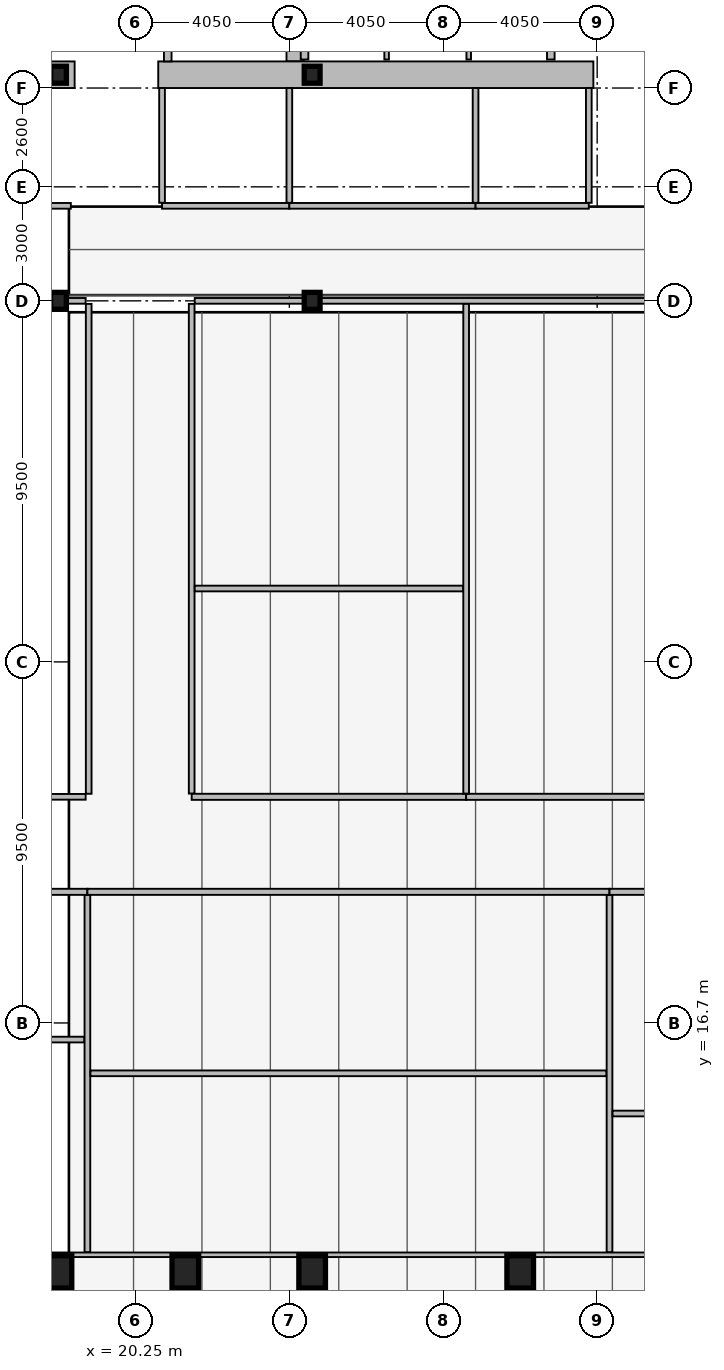
"""IFC4 building model, lengths in metres.
Left out: names, types, materials, properties, quantities, classifications, styles, units other than length and angle.
Written with IfcOpenShell. Run it as: python <this file> out.ifc"""

import sys

from ifc_helpers import new_model, si_unit, direction, frame, frame_2d, origin, origin_2d, place, context, subcontext, project, spatial, rectangle, hollow_rectangle, i_section, extrude, element, fill, save


model = new_model("IFC4")
c1 = context("Model", 3, precision=1e-05, world=origin(), true_north=direction((0.0, 1.0)))
c2 = subcontext(c1, "Body", "Model", "MODEL_VIEW")
j1 = project(units=[si_unit("LENGTHUNIT", "METRE"), si_unit("PLANEANGLEUNIT", "RADIAN")], contexts=[c1])
p1 = place(None, origin())
s1 = spatial("IfcSite", under=j1, at=p1, CompositionType="ELEMENT")
p2 = place(p1, origin())
s2 = spatial("IfcBuilding", under=s1, at=p2, CompositionType="ELEMENT")
p3 = place(p2, frame((0.0, 0.0, 154.2)))
s3 = spatial("IfcBuildingStorey", under=s2, at=p3, CompositionType="ELEMENT", Elevation=154.2)
p4 = place(p3, frame((24.45, 42.0, 0.0), z_axis=(0.0, 0.0, 1.0), x_axis=(0.0, 1.0, 0.0)))
e1 = element("IfcWall", 1, at=p4, inside=s3, PredefinedType="SHEAR", context=c2, shape_type="SweptSolid", body=[
    extrude(rectangle(XDim=11.0, YDim=0.45, at=frame_2d((5.5, 0.0))), origin(), (0.0, 0.0, 1.0), 3.44),
])
p5 = place(p3, frame((18.65, 41.65, 0.0), z_axis=(0.0, 0.0, 1.0), x_axis=(-1.0, 0.0, 0.0)))
e2 = element("IfcWall", 2, at=p5, inside=s3, PredefinedType="SHEAR", context=c2, shape_type="SweptSolid", body=[
    extrude(rectangle(XDim=2.45, YDim=0.7, at=frame_2d((1.225, 0.0))), origin(), (0.0, 0.0, 1.0), 3.44),
])
p6 = place(p3, frame((32.3, 41.65, 0.0), z_axis=(0.0, 0.0, 1.0), x_axis=(-1.0, 0.0, 0.0)))
e3 = element("IfcWall", 3, at=p6, inside=s3, PredefinedType="SHEAR", context=c2, shape_type="SweptSolid", body=[
    extrude(rectangle(XDim=11.45, YDim=0.7, at=frame_2d((5.725, 0.0))), origin(), (0.0, 0.0, 1.0), 3.44),
])
for number, where, z_axis, x_axis in (
    (4, (18.225, 10.15, 0.0), (0.0, 0.0, 1.0), (1.0, 0.0, 0.0)),
    (5, (21.562, 10.15, 0.0), (0.0, 0.0, 1.0), (1.0, 0.0, 0.0)),
    (6, (24.9, 10.15, 0.0), (0.0, 0.0, 1.0), (1.0, 0.0, 0.0)),
    (7, (30.375, 10.15, 0.0), (0.0, 0.0, 1.0), (1.0, 0.0, 0.0)),
):
    element("IfcColumn", number, at=place(p3, frame(where, z_axis=z_axis, x_axis=x_axis)), inside=s3, PredefinedType="COLUMN", context=c2, shape_type="SweptSolid", body=[
        extrude(hollow_rectangle(XDim=0.7, YDim=0.85, WallThickness=0.05, at=origin_2d()), origin(), (0.0, 0.0, 1.0), 3.6),
    ])
for number, where, z_axis, x_axis in (
    (8, (18.225, 35.7, 0.0), (0.0, 0.0, 1.0), (1.0, 0.0, 0.0)),
    (9, (18.225, 41.65, 0.0), (0.0, 0.0, 1.0), (1.0, 0.0, 0.0)),
    (10, (24.9, 35.7, 0.0), (0.0, 0.0, 1.0), (1.0, 0.0, 0.0)),
    (11, (24.9, 41.65, 0.0), (0.0, 0.0, 1.0), (1.0, 0.0, 0.0)),
):
    element("IfcColumn", number, at=place(p3, frame(where, z_axis=z_axis, x_axis=x_axis)), inside=s3, PredefinedType="COLUMN", context=c2, shape_type="SweptSolid", body=[
        extrude(i_section(OverallWidth=0.416, OverallDepth=0.446, WebThickness=0.039, FlangeThickness=0.063, at=origin_2d()), origin(), (0.0, 0.0, 1.0), 3.6),
    ])
p7 = place(p3, frame((21.1, 42.0, 0.0), z_axis=(0.0, 0.0, 1.0), x_axis=(0.0, 1.0, 0.0)))
e12 = element("IfcWall", 12, at=p7, inside=s3, PredefinedType="PARTITIONING", context=c2, shape_type="SweptSolid", body=[
    extrude(rectangle(XDim=2.495, YDim=0.2, at=frame_2d((1.248, 0.0))), origin(), (0.0, 0.0, 1.0), 3.44),
])
p8 = place(p7, frame((0.38, 0.0, 0.0)))
e13 = element("IfcOpeningElement", 13, at=p8, cuts=e12, PredefinedType="OPENING", context=c2, shape_type="SweptSolid", body=[
    extrude(rectangle(XDim=1.05, YDim=2.15, at=frame_2d((0.525, 1.075))), frame((0.0, 0.11, 0.0), z_axis=(0.0, -1.0, 0.0), x_axis=(1.0, 0.0, 0.0)), (0.0, 0.0, 1.0), 0.22),
])
for number, where, z_axis, x_axis in (
    (14, (24.7, 42.05, 0.0), (0.0, 0.0, 1.0), (0.0, 1.0, 0.0)),
    (15, (31.18, 42.05, 0.0), (0.0, 0.0, 1.0), (0.0, 1.0, 0.0)),
):
    element("IfcWall", number, at=place(p3, frame(where, z_axis=z_axis, x_axis=x_axis)), inside=s3, PredefinedType="PARTITIONING", context=c2, shape_type="SweptSolid", body=[
        extrude(rectangle(XDim=2.2, YDim=0.2, at=frame_2d((1.1, 0.0))), origin(), (0.0, 0.0, 1.0), 3.44),
    ])
for number, where, z_axis, x_axis in (
    (16, (26.86, 42.05, 0.0), (0.0, 0.0, 1.0), (0.0, 1.0, 0.0)),
    (17, (29.02, 42.05, 0.0), (0.0, 0.0, 1.0), (0.0, 1.0, 0.0)),
):
    element("IfcWall", number, at=place(p3, frame(where, z_axis=z_axis, x_axis=x_axis)), inside=s3, PredefinedType="PARTITIONING", context=c2, shape_type="SweptSolid", body=[
        extrude(rectangle(XDim=2.2, YDim=0.12, at=frame_2d((1.1, 0.0))), origin(), (0.0, 0.0, 1.0), 3.44),
    ])
p9 = place(p3, frame((20.95, 38.2, 0.0), z_axis=(0.0, 0.0, 1.0), x_axis=(1.0, 0.0, 0.0)))
e18 = element("IfcWall", 18, at=p9, inside=s3, PredefinedType="PARTITIONING", context=c2, shape_type="SweptSolid", body=[
    extrude(rectangle(XDim=3.35, YDim=0.15, at=frame_2d((1.675, 0.0))), origin(), (0.0, 0.0, 1.0), 3.44),
])
p10 = place(p9, frame((0.9, 0.0, 0.0)))
e19 = element("IfcOpeningElement", 19, at=p10, cuts=e18, PredefinedType="OPENING", context=c2, shape_type="SweptSolid", body=[
    extrude(rectangle(XDim=0.95, YDim=2.05, at=frame_2d((0.475, 1.025))), frame((0.0, 0.085, 0.0), z_axis=(0.0, -1.0, 0.0), x_axis=(1.0, 0.0, 0.0)), (0.0, 0.0, 1.0), 0.17),
])
p11 = place(p3, frame((24.3, 38.2, 0.0), z_axis=(0.0, 0.0, 1.0), x_axis=(1.0, 0.0, 0.0)))
e20 = element("IfcWall", 20, at=p11, inside=s3, PredefinedType="PARTITIONING", context=c2, shape_type="SweptSolid", body=[
    extrude(rectangle(XDim=4.9, YDim=0.15, at=frame_2d((2.45, 0.0))), origin(), (0.0, 0.0, 1.0), 2.73),
])
p12 = place(p11, frame((0.9, 0.0, 0.0)))
e21 = element("IfcOpeningElement", 21, at=p12, cuts=e20, PredefinedType="OPENING", context=c2, shape_type="SweptSolid", body=[
    extrude(rectangle(XDim=0.95, YDim=2.05, at=frame_2d((0.475, 1.025))), frame((0.0, 0.085, 0.0), z_axis=(0.0, -1.0, 0.0), x_axis=(1.0, 0.0, 0.0)), (0.0, 0.0, 1.0), 0.17),
])
p13 = place(p3, frame((29.2, 38.2, 0.0), z_axis=(0.0, 0.0, 1.0), x_axis=(1.0, 0.0, 0.0)))
e22 = element("IfcWall", 22, at=p13, inside=s3, PredefinedType="PARTITIONING", context=c2, shape_type="SweptSolid", body=[
    extrude(rectangle(XDim=2.98, YDim=0.15, at=frame_2d((1.49, 0.0))), origin(), (0.0, 0.0, 1.0), 2.73),
])
p14 = place(p13, frame((0.7, 0.0, 0.0)))
e23 = element("IfcOpeningElement", 23, at=p14, cuts=e22, PredefinedType="OPENING", context=c2, shape_type="SweptSolid", body=[
    extrude(rectangle(XDim=0.95, YDim=2.05, at=frame_2d((0.475, 1.025))), frame((0.0, 0.085, 0.0), z_axis=(0.0, -1.0, 0.0), x_axis=(1.0, 0.0, 0.0)), (0.0, 0.0, 1.0), 0.17),
])
for number, where, z_axis, x_axis in (
    (24, (20.95, 38.28, 0.0), (0.0, 0.0, 1.0), (0.0, 1.0, 0.0)),
    (25, (24.3, 38.28, 0.0), (0.0, 0.0, 1.0), (0.0, 1.0, 0.0)),
    (26, (29.2, 38.28, 0.0), (0.0, 0.0, 1.0), (0.0, 1.0, 0.0)),
    (27, (32.18, 38.28, 0.0), (0.0, 0.0, 1.0), (0.0, 1.0, 0.0)),
):
    element("IfcWall", number, at=place(p3, frame(where, z_axis=z_axis, x_axis=x_axis)), inside=s3, PredefinedType="PARTITIONING", context=c2, shape_type="SweptSolid", body=[
        extrude(rectangle(XDim=3.02, YDim=0.15, at=frame_2d((1.51, 0.0))), origin(), (0.0, 0.0, 1.0), 3.44),
    ])
p15 = place(p3, frame((6.03, 38.2, 0.0), z_axis=(0.0, 0.0, 1.0), x_axis=(1.0, 0.0, 0.0)))
e28 = element("IfcWall", 28, at=p15, inside=s3, PredefinedType="PARTITIONING", context=c2, shape_type="SweptSolid", body=[
    extrude(rectangle(XDim=12.52, YDim=0.15, at=frame_2d((6.26, 0.0))), origin(), (0.0, 0.0, 1.0), 2.73),
])
p16 = place(p15, frame((8.32, 0.0, 0.0)))
e29 = element("IfcOpeningElement", 29, at=p16, cuts=e28, PredefinedType="OPENING", context=c2, shape_type="SweptSolid", body=[
    extrude(rectangle(XDim=0.95, YDim=2.05, at=frame_2d((0.475, 1.025))), frame((0.0, 0.085, 0.0), z_axis=(0.0, -1.0, 0.0), x_axis=(1.0, 0.0, 0.0)), (0.0, 0.0, 1.0), 0.17),
])
p17 = place(p3, frame((6.03, 20.15, 0.0), z_axis=(0.0, 0.0, 1.0), x_axis=(1.0, 0.0, 0.0)))
e30 = element("IfcWall", 30, at=p17, inside=s3, PredefinedType="PARTITIONING", context=c2, shape_type="SweptSolid", body=[
    extrude(rectangle(XDim=12.956, YDim=0.16, at=frame_2d((6.478, 0.0))), origin(), (0.0, 0.0, 1.0), 2.73),
])
p18 = place(p17, frame((5.691, 0.0, 0.0)))
e31 = element("IfcOpeningElement", 31, at=p18, cuts=e30, PredefinedType="OPENING", context=c2, shape_type="SweptSolid", body=[
    extrude(rectangle(XDim=1.0, YDim=2.05, at=frame_2d((0.5, 1.025))), frame((0.0, 0.09, 0.0), z_axis=(0.0, -1.0, 0.0), x_axis=(1.0, 0.0, 0.0)), (0.0, 0.0, 1.0), 0.18),
])
p19 = place(p3, frame((6.095, 16.263, 0.0), z_axis=(0.0, 0.0, 1.0), x_axis=(1.0, 0.0, 0.0)))
e32 = element("IfcWall", 32, at=p19, inside=s3, PredefinedType="PARTITIONING", context=c2, shape_type="SweptSolid", body=[
    extrude(rectangle(XDim=12.811, YDim=0.15, at=frame_2d((6.406, 0.0))), origin(), (0.0, 0.0, 1.0), 2.73),
])
p20 = place(p19, frame((5.83, 0.0, 0.0)))
e33 = element("IfcOpeningElement", 33, at=p20, cuts=e32, PredefinedType="OPENING", context=c2, shape_type="SweptSolid", body=[
    extrude(rectangle(XDim=0.9, YDim=2.05, at=frame_2d((0.45, 1.025))), frame((0.0, 0.085, 0.0), z_axis=(0.0, -1.0, 0.0), x_axis=(1.0, 0.0, 0.0)), (0.0, 0.0, 1.0), 0.17),
])
p21 = place(p3, frame((18.986, 20.15, 0.0), z_axis=(0.0, 0.0, 1.0), x_axis=(1.0, 0.0, 0.0)))
e34 = element("IfcWall", 34, at=p21, inside=s3, PredefinedType="PARTITIONING", context=c2, shape_type="SweptSolid", body=[
    extrude(rectangle(XDim=13.739, YDim=0.16, at=frame_2d((6.869, 0.0))), origin(), (0.0, 0.0, 1.0), 2.73),
])
p22 = place(p21, frame((6.02, 0.0, 0.0)))
e35 = element("IfcOpeningElement", 35, at=p22, cuts=e34, PredefinedType="OPENING", context=c2, shape_type="SweptSolid", body=[
    extrude(rectangle(XDim=1.0, YDim=2.05, at=frame_2d((0.5, 1.025))), frame((0.0, 0.09, 0.0), z_axis=(0.0, -1.0, 0.0), x_axis=(1.0, 0.0, 0.0)), (0.0, 0.0, 1.0), 0.18),
])
p23 = place(p3, frame((18.986, 10.665, 0.0), z_axis=(0.0, 0.0, 1.0), x_axis=(0.0, 1.0, 0.0)))
e36 = element("IfcWall", 36, at=p23, inside=s3, PredefinedType="PARTITIONING", context=c2, shape_type="SweptSolid", body=[
    extrude(rectangle(XDim=9.4, YDim=0.15, at=frame_2d((4.7, 0.0))), origin(), (0.0, 0.0, 1.0), 2.93),
])
p24 = place(p3, frame((19.066, 15.375, 0.0), z_axis=(0.0, 0.0, 1.0), x_axis=(1.0, 0.0, 0.0)))
e37 = element("IfcWall", 37, at=p24, inside=s3, PredefinedType="PARTITIONING", context=c2, shape_type="SweptSolid", body=[
    extrude(rectangle(XDim=13.579, YDim=0.15, at=frame_2d((6.79, 0.0))), origin(), (0.0, 0.0, 1.0), 2.73),
])
p25 = place(p24, frame((6.183, 0.0, 0.0)))
e38 = element("IfcOpeningElement", 38, at=p25, cuts=e37, PredefinedType="OPENING", context=c2, shape_type="SweptSolid", body=[
    extrude(rectangle(XDim=0.9, YDim=2.05, at=frame_2d((0.45, 1.025))), frame((0.0, 0.085, 0.0), z_axis=(0.0, -1.0, 0.0), x_axis=(1.0, 0.0, 0.0)), (0.0, 0.0, 1.0), 0.17),
])
p26 = place(p3, frame((32.725, 20.15, 0.0), z_axis=(0.0, 0.0, 1.0), x_axis=(1.0, 0.0, 0.0)))
e39 = element("IfcWall", 39, at=p26, inside=s3, PredefinedType="PARTITIONING", context=c2, shape_type="SweptSolid", body=[
    extrude(rectangle(XDim=14.093, YDim=0.16, at=frame_2d((7.046, 0.0))), origin(), (0.0, 0.0, 1.0), 2.73),
])
p27 = place(p26, frame((6.169, 0.0, 0.0)))
e40 = element("IfcOpeningElement", 40, at=p27, cuts=e39, PredefinedType="OPENING", context=c2, shape_type="SweptSolid", body=[
    extrude(rectangle(XDim=1.6, YDim=2.15, at=frame_2d((0.8, 1.075))), frame((0.0, 0.09, 0.0), z_axis=(0.0, -1.0, 0.0), x_axis=(1.0, 0.0, 0.0)), (0.0, 0.0, 1.0), 0.18),
])
p28 = place(p3, frame((32.725, 10.665, 0.0), z_axis=(0.0, 0.0, 1.0), x_axis=(0.0, 1.0, 0.0)))
e41 = element("IfcWall", 41, at=p28, inside=s3, PredefinedType="PARTITIONING", context=c2, shape_type="SweptSolid", body=[
    extrude(rectangle(XDim=9.4, YDim=0.15, at=frame_2d((4.7, 0.0))), origin(), (0.0, 0.0, 1.0), 2.93),
])
p29 = place(p3, frame((32.805, 14.317, 0.0), z_axis=(0.0, 0.0, 1.0), x_axis=(1.0, 0.0, 0.0)))
e42 = element("IfcWall", 42, at=p29, inside=s3, PredefinedType="PARTITIONING", context=c2, shape_type="SweptSolid", body=[
    extrude(rectangle(XDim=13.933, YDim=0.15, at=frame_2d((6.966, 0.0))), origin(), (0.0, 0.0, 1.0), 2.73),
])
p30 = place(p29, frame((6.342, 0.0, 0.0)))
e43 = element("IfcOpeningElement", 43, at=p30, cuts=e42, PredefinedType="OPENING", context=c2, shape_type="SweptSolid", body=[
    extrude(rectangle(XDim=0.9, YDim=2.05, at=frame_2d((0.45, 1.025))), frame((0.0, 0.085, 0.0), z_axis=(0.0, -1.0, 0.0), x_axis=(1.0, 0.0, 0.0)), (0.0, 0.0, 1.0), 0.17),
])
p31 = place(p3, frame((19.02, 22.73, 0.0), z_axis=(0.0, 0.0, 1.0), x_axis=(0.0, 1.0, 0.0)))
e44 = element("IfcWall", 44, at=p31, inside=s3, PredefinedType="PARTITIONING", context=c2, shape_type="SweptSolid", body=[
    extrude(rectangle(XDim=12.89, YDim=0.15, at=frame_2d((6.445, 0.0))), origin(), (0.0, 0.0, 1.0), 2.93),
])
p32 = place(p31, frame((3.2, 0.0, 0.0)))
e45 = element("IfcOpeningElement", 45, at=p32, cuts=e44, PredefinedType="OPENING", context=c2, shape_type="SweptSolid", body=[
    extrude(rectangle(XDim=1.0, YDim=2.05, at=frame_2d((0.5, 1.025))), frame((0.0, 0.085, 0.0), z_axis=(0.0, -1.0, 0.0), x_axis=(1.0, 0.0, 0.0)), (0.0, 0.0, 1.0), 0.17),
])
for number, where, z_axis, x_axis in (
    (46, (6.095, 22.65, 0.0), (0.0, 0.0, 1.0), (1.0, 0.0, 0.0)),
    (47, (6.095, 35.7, 0.0), (0.0, 0.0, 1.0), (1.0, 0.0, 0.0)),
):
    element("IfcWall", number, at=place(p3, frame(where, z_axis=z_axis, x_axis=x_axis)), inside=s3, PredefinedType="PARTITIONING", context=c2, shape_type="SweptSolid", body=[
        extrude(rectangle(XDim=12.845, YDim=0.15, at=frame_2d((6.422, 0.0))), origin(), (0.0, 0.0, 1.0), 2.73),
    ])
p33 = place(p3, frame((21.73, 22.735, 0.0), z_axis=(0.0, 0.0, 1.0), x_axis=(0.0, 1.0, 0.0)))
e48 = element("IfcWall", 48, at=p33, inside=s3, PredefinedType="PARTITIONING", context=c2, shape_type="SweptSolid", body=[
    extrude(rectangle(XDim=12.885, YDim=0.15, at=frame_2d((6.442, 0.0))), origin(), (0.0, 0.0, 1.0), 2.93),
])
p34 = place(p3, frame((21.81, 35.7, 0.0), z_axis=(0.0, 0.0, 1.0), x_axis=(1.0, 0.0, 0.0)))
e49 = element("IfcWall", 49, at=p34, inside=s3, PredefinedType="PARTITIONING", context=c2, shape_type="SweptSolid", body=[
    extrude(rectangle(XDim=44.995, YDim=0.15, at=frame_2d((22.498, 0.0))), origin(), (0.0, 0.0, 1.0), 2.73),
])
p35 = place(p3, frame((21.73, 22.65, 0.0), z_axis=(0.0, 0.0, 1.0), x_axis=(1.0, 0.0, 0.0)))
e50 = element("IfcWall", 50, at=p35, inside=s3, PredefinedType="PARTITIONING", context=c2, shape_type="SweptSolid", body=[
    extrude(rectangle(XDim=7.222, YDim=0.16, at=frame_2d((3.611, 0.0))), origin(), (0.0, 0.0, 1.0), 2.73),
])
p36 = place(p35, frame((3.283, 0.0, 0.0)))
e51 = element("IfcOpeningElement", 51, at=p36, cuts=e50, PredefinedType="OPENING", context=c2, shape_type="SweptSolid", body=[
    extrude(rectangle(XDim=1.0, YDim=2.05, at=frame_2d((0.5, 1.025))), frame((0.0, 0.09, 0.0), z_axis=(0.0, -1.0, 0.0), x_axis=(1.0, 0.0, 0.0)), (0.0, 0.0, 1.0), 0.18),
])
p37 = place(p3, frame((21.81, 28.131, 0.0), z_axis=(0.0, 0.0, 1.0), x_axis=(1.0, 0.0, 0.0)))
e52 = element("IfcWall", 52, at=p37, inside=s3, PredefinedType="PARTITIONING", context=c2, shape_type="SweptSolid", body=[
    extrude(rectangle(XDim=7.062, YDim=0.15, at=frame_2d((3.531, 0.0))), origin(), (0.0, 0.0, 1.0), 2.73),
])
p38 = place(p37, frame((3.25, 0.0, 0.0)))
e53 = element("IfcOpeningElement", 53, at=p38, cuts=e52, PredefinedType="OPENING", context=c2, shape_type="SweptSolid", body=[
    extrude(rectangle(XDim=0.9, YDim=2.05, at=frame_2d((0.45, 1.025))), frame((0.0, 0.085, 0.0), z_axis=(0.0, -1.0, 0.0), x_axis=(1.0, 0.0, 0.0)), (0.0, 0.0, 1.0), 0.17),
])
p39 = place(p3, frame((28.952, 22.65, 0.0), z_axis=(0.0, 0.0, 1.0), x_axis=(1.0, 0.0, 0.0)))
e54 = element("IfcWall", 54, at=p39, inside=s3, PredefinedType="PARTITIONING", context=c2, shape_type="SweptSolid", body=[
    extrude(rectangle(XDim=9.931, YDim=0.16, at=frame_2d((4.965, 0.0))), origin(), (0.0, 0.0, 1.0), 2.73),
])
p40 = place(p39, frame((4.421, 0.0, 0.0)))
e55 = element("IfcOpeningElement", 55, at=p40, cuts=e54, PredefinedType="OPENING", context=c2, shape_type="SweptSolid", body=[
    extrude(rectangle(XDim=1.0, YDim=2.05, at=frame_2d((0.5, 1.025))), frame((0.0, 0.09, 0.0), z_axis=(0.0, -1.0, 0.0), x_axis=(1.0, 0.0, 0.0)), (0.0, 0.0, 1.0), 0.18),
])
p41 = place(p3, frame((28.952, 22.735, 0.0), z_axis=(0.0, 0.0, 1.0), x_axis=(0.0, 1.0, 0.0)))
e56 = element("IfcWall", 56, at=p41, inside=s3, PredefinedType="PARTITIONING", context=c2, shape_type="SweptSolid", body=[
    extrude(rectangle(XDim=12.885, YDim=0.15, at=frame_2d((6.442, 0.0))), origin(), (0.0, 0.0, 1.0), 2.93),
])
p42 = place(p3, frame((6.095, 10.6, 0.0), z_axis=(0.0, 0.0, 1.0), x_axis=(1.0, 0.0, 0.0)))
e57 = element("IfcWall", 57, at=p42, inside=s3, PredefinedType="PARTITIONING", context=c2, shape_type="SweptSolid", body=[
    extrude(rectangle(XDim=60.71, YDim=0.12, at=frame_2d((30.355, 0.0))), origin(), (0.0, 0.0, 1.0), 2.73),
])
p43 = place(p10, origin())
e58 = element("IfcDoor", 58, at=p43, inside=s3, OperationType="SINGLE_SWING_LEFT", PredefinedType="DOOR", context=c2, shape_type="SweptSolid", body=[
    extrude(rectangle(XDim=0.95, YDim=2.05, at=frame_2d((0.475, 1.025))), frame((0.0, 0.025, 0.0), z_axis=(0.0, -1.0, 0.0), x_axis=(1.0, 0.0, 0.0)), (0.0, 0.0, 1.0), 0.05),
])
fill(e19, e58)
p44 = place(p12, origin())
e59 = element("IfcDoor", 59, at=p44, inside=s3, OperationType="SINGLE_SWING_RIGHT", PredefinedType="DOOR", context=c2, shape_type="SweptSolid", body=[
    extrude(rectangle(XDim=0.95, YDim=2.05, at=frame_2d((0.475, 1.025))), frame((0.0, 0.025, 0.0), z_axis=(0.0, -1.0, 0.0), x_axis=(1.0, 0.0, 0.0)), (0.0, 0.0, 1.0), 0.05),
])
fill(e21, e59)
p45 = place(p14, origin())
e60 = element("IfcDoor", 60, at=p45, inside=s3, OperationType="SINGLE_SWING_LEFT", PredefinedType="DOOR", context=c2, shape_type="SweptSolid", body=[
    extrude(rectangle(XDim=0.95, YDim=2.05, at=frame_2d((0.475, 1.025))), frame((0.0, 0.025, 0.0), z_axis=(0.0, -1.0, 0.0), x_axis=(1.0, 0.0, 0.0)), (0.0, 0.0, 1.0), 0.05),
])
fill(e23, e60)
p46 = place(p22, origin())
e61 = element("IfcDoor", 61, at=p46, inside=s3, OperationType="SINGLE_SWING_RIGHT", PredefinedType="DOOR", context=c2, shape_type="SweptSolid", body=[
    extrude(rectangle(XDim=1.0, YDim=2.05, at=frame_2d((0.5, 1.025))), frame((0.0, 0.025, 0.0), z_axis=(0.0, -1.0, 0.0), x_axis=(1.0, 0.0, 0.0)), (0.0, 0.0, 1.0), 0.05),
])
fill(e35, e61)
p47 = place(p25, origin())
e62 = element("IfcDoor", 62, at=p47, inside=s3, OperationType="SINGLE_SWING_LEFT", PredefinedType="DOOR", context=c2, shape_type="SweptSolid", body=[
    extrude(rectangle(XDim=0.9, YDim=2.05, at=frame_2d((0.45, 1.025))), frame((0.0, 0.025, 0.0), z_axis=(0.0, -1.0, 0.0), x_axis=(1.0, 0.0, 0.0)), (0.0, 0.0, 1.0), 0.05),
])
fill(e38, e62)
p48 = place(p32, origin())
e63 = element("IfcDoor", 63, at=p48, inside=s3, OperationType="SINGLE_SWING_RIGHT", PredefinedType="DOOR", context=c2, shape_type="SweptSolid", body=[
    extrude(rectangle(XDim=1.0, YDim=2.05, at=frame_2d((0.5, 1.025))), frame((0.0, 0.025, 0.0), z_axis=(0.0, -1.0, 0.0), x_axis=(1.0, 0.0, 0.0)), (0.0, 0.0, 1.0), 0.05),
])
fill(e45, e63)
p49 = place(p36, origin())
e64 = element("IfcDoor", 64, at=p49, inside=s3, OperationType="SINGLE_SWING_LEFT", PredefinedType="DOOR", context=c2, shape_type="SweptSolid", body=[
    extrude(rectangle(XDim=1.0, YDim=2.05, at=frame_2d((0.5, 1.025))), frame((0.0, 0.025, 0.0), z_axis=(0.0, -1.0, 0.0), x_axis=(1.0, 0.0, 0.0)), (0.0, 0.0, 1.0), 0.05),
])
fill(e51, e64)
p50 = place(p38, origin())
e65 = element("IfcDoor", 65, at=p50, inside=s3, OperationType="SINGLE_SWING_RIGHT", PredefinedType="DOOR", context=c2, shape_type="SweptSolid", body=[
    extrude(rectangle(XDim=0.9, YDim=2.05, at=frame_2d((0.45, 1.025))), frame((0.0, 0.025, 0.0), z_axis=(0.0, -1.0, 0.0), x_axis=(1.0, 0.0, 0.0)), (0.0, 0.0, 1.0), 0.05),
])
fill(e53, e65)
p51 = place(p40, origin())
e66 = element("IfcDoor", 66, at=p51, inside=s3, OperationType="SINGLE_SWING_LEFT", PredefinedType="DOOR", context=c2, shape_type="SweptSolid", body=[
    extrude(rectangle(XDim=1.0, YDim=2.05, at=frame_2d((0.5, 1.025))), frame((0.0, 0.025, 0.0), z_axis=(0.0, -1.0, 0.0), x_axis=(1.0, 0.0, 0.0)), (0.0, 0.0, 1.0), 0.05),
])
fill(e55, e66)
save(model, sys.argv[1])
